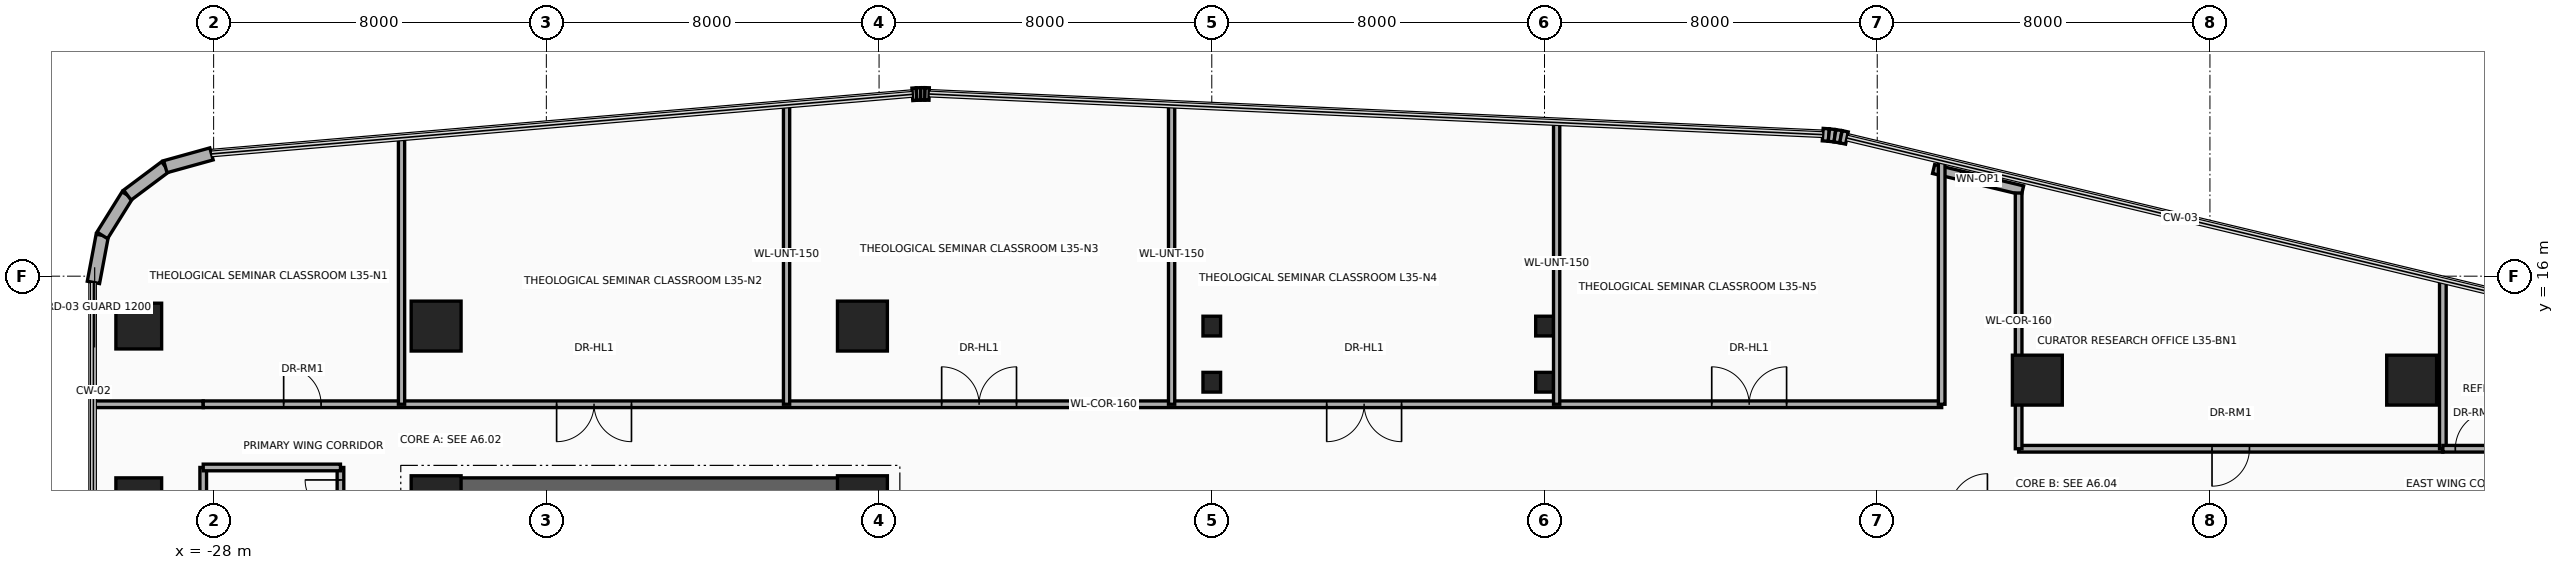
"""IFC4 building model, lengths in metres.
Left out: names, types, materials, properties, quantities, classifications, styles, units other than length and angle.
Written with IfcOpenShell. Run it as: python <this file> out.ifc"""

import sys

from ifc_helpers import new_model, si_unit, direction, frame, frame_2d, origin, origin_2d, place, context, subcontext, project, spatial, rectangle, circle, i_section, extrude, source, transform, mapped, element, fill, save


model = new_model("IFC4")
c1 = context("Model", 3, precision=1e-05, world=origin(), true_north=direction((0.0, 1.0)))
c2 = subcontext(c1, "Body", "Model", "MODEL_VIEW")
j1 = project(units=[si_unit("LENGTHUNIT", "METRE"), si_unit("PLANEANGLEUNIT", "RADIAN")], contexts=[c1])
p1 = place(None, origin())
s1 = spatial("IfcSite", under=j1, at=p1, CompositionType="ELEMENT")
p2 = place(p1, origin())
s2 = spatial("IfcBuilding", under=s1, at=p2, CompositionType="ELEMENT")
p3 = place(p2, frame((0.0, 0.0, 139.0)))
s3 = spatial("IfcBuildingStorey", under=s2, at=p3, CompositionType="ELEMENT", Elevation=139.0)
p4 = place(p3, frame((-22.65, -11.15, 0.0), z_axis=(0.0, 0.0, 1.0), x_axis=(0.0, 1.0, 0.0)))
e1 = element("IfcWall", 1, at=p4, inside=s3, PredefinedType="SHEAR", context=c2, shape_type="SweptSolid", body=[
    extrude(rectangle(XDim=22.3, YDim=0.7, at=frame_2d((11.15, 0.0))), origin(), (0.0, 0.0, 1.0), 3.46),
])
p5 = place(p3, frame((-22.65, 10.8, 0.0), z_axis=(0.0, 0.0, 1.0), x_axis=(1.0, 0.0, 0.0)))
e2 = element("IfcWall", 2, at=p5, inside=s3, PredefinedType="SHEAR", context=c2, shape_type="SweptSolid", body=[
    extrude(rectangle(XDim=10.25, YDim=0.7, at=frame_2d((5.125, 0.0))), origin(), (0.0, 0.0, 1.0), 3.46),
])
m1 = source(origin(), c2, "Body", "SweptSolid", [
    extrude(circle(Radius=0.55, at=origin_2d()), origin(), (0.0, 0.0, 1.0), 3.7),
])
p6 = place(p3, frame((-29.8, 10.6, 0.0), z_axis=(0.0, 0.0, 1.0), x_axis=(1.0, 0.0, 0.0)))
e3 = element("IfcColumn", 3, at=p6, inside=s3, PredefinedType="COLUMN", context=c2, shape_type="MappedRepresentation", body=[
    mapped(m1, transform((0.0, 0.0, 0.0), x_axis=(1.0, 0.0, 0.0), y_axis=(0.0, 1.0, 0.0), z_axis=(0.0, 0.0, 1.0), scale=1.0)),
])
m2 = source(origin(), c2, "Body", "SweptSolid", [
    extrude(rectangle(XDim=1.2, YDim=1.2, at=origin_2d()), origin(), (0.0, 0.0, 1.0), 3.7),
])
for number, where, z_axis, x_axis in (
    (4, (-22.65, 10.6, 0.0), (0.0, 0.0, 1.0), (1.0, 0.0, 0.0)),
    (5, (-12.4, 10.6, 0.0), (0.0, 0.0, 1.0), (1.0, 0.0, 0.0)),
):
    element("IfcColumn", number, at=place(p3, frame(where, z_axis=z_axis, x_axis=x_axis)), inside=s3, PredefinedType="COLUMN", context=c2, shape_type="MappedRepresentation", body=[
        mapped(m2, transform((0.0, 0.0, 0.0), x_axis=(1.0, 0.0, 0.0), y_axis=(0.0, 1.0, 0.0), z_axis=(0.0, 0.0, 1.0), scale=1.0)),
    ])
p7 = place(p3, frame((-29.8, 14.8, 0.0), z_axis=(0.0, 0.0, 1.0), x_axis=(1.0, 0.0, 0.0)))
e6 = element("IfcColumn", 6, at=p7, inside=s3, PredefinedType="COLUMN", context=c2, shape_type="MappedRepresentation", body=[
    mapped(m1, transform((0.0, 0.0, 0.0), x_axis=(1.0, 0.0, 0.0), y_axis=(0.0, 1.0, 0.0), z_axis=(0.0, 0.0, 1.0), scale=1.0)),
])
for number, where, z_axis, x_axis in (
    (7, (-22.65, 14.8, 0.0), (0.0, 0.0, 1.0), (1.0, 0.0, 0.0)),
    (8, (-12.4, 14.8, 0.0), (0.0, 0.0, 1.0), (1.0, 0.0, 0.0)),
    (9, (15.85, 13.5, 0.0), (0.0, 0.0, 1.0), (1.0, 0.0, 0.0)),
    (10, (24.85, 13.5, 0.0), (0.0, 0.0, 1.0), (1.0, 0.0, 0.0)),
):
    element("IfcColumn", number, at=place(p3, frame(where, z_axis=z_axis, x_axis=x_axis)), inside=s3, PredefinedType="COLUMN", context=c2, shape_type="MappedRepresentation", body=[
        mapped(m2, transform((0.0, 0.0, 0.0), x_axis=(1.0, 0.0, 0.0), y_axis=(0.0, 1.0, 0.0), z_axis=(0.0, 0.0, 1.0), scale=1.0)),
    ])
m3 = source(origin(), c2, "Body", "SweptSolid", [
    extrude(i_section(OverallWidth=0.424, OverallDepth=0.474, WebThickness=0.048, FlangeThickness=0.077, at=origin_2d()), origin(), (0.0, 0.0, 1.0), 3.7),
])
for number, where, z_axis, x_axis in (
    (11, (-4.0, 13.45, 0.0), (0.0, 0.0, 1.0), (1.0, 0.0, 0.0)),
    (12, (-4.0, 14.8, 0.0), (0.0, 0.0, 1.0), (1.0, 0.0, 0.0)),
    (13, (4.0, 13.45, 0.0), (0.0, 0.0, 1.0), (1.0, 0.0, 0.0)),
    (14, (4.0, 14.8, 0.0), (0.0, 0.0, 1.0), (1.0, 0.0, 0.0)),
):
    element("IfcColumn", number, at=place(p3, frame(where, z_axis=z_axis, x_axis=x_axis)), inside=s3, PredefinedType="COLUMN", context=c2, shape_type="MappedRepresentation", body=[
        mapped(m3, transform((0.0, 0.0, 0.0), x_axis=(1.0, 0.0, 0.0), y_axis=(0.0, 1.0, 0.0), z_axis=(0.0, 0.0, 1.0), scale=1.0)),
    ])
p8 = place(p3, frame((-30.89, 15.85, 0.0), z_axis=(0.0, 0.0, 1.0), x_axis=(0.184557499391, 0.982821718023, 0.0)))
e15 = element("IfcWall", 15, at=p8, inside=s3, PredefinedType="SOLIDWALL", context=c2, shape_type="SweptSolid", body=[
    extrude(rectangle(XDim=1.151, YDim=0.3, at=frame_2d((0.575, 0.0))), origin(), (0.0, 0.0, 1.0), 3.46),
])
p9 = place(p3, frame((-30.677, 16.981, 0.0), z_axis=(0.0, 0.0, 1.0), x_axis=(0.52880576008, 0.848742875143, 0.0)))
e16 = element("IfcWall", 16, at=p9, inside=s3, PredefinedType="SOLIDWALL", context=c2, shape_type="SweptSolid", body=[
    extrude(rectangle(XDim=1.141, YDim=0.3, at=frame_2d((0.57, 0.0))), origin(), (0.0, 0.0, 1.0), 3.46),
])
p10 = place(p3, frame((-30.074, 17.95, 0.0), z_axis=(0.0, 0.0, 1.0), x_axis=(0.800975009324, 0.598697782223, 0.0)))
e17 = element("IfcWall", 17, at=p10, inside=s3, PredefinedType="SOLIDWALL", context=c2, shape_type="SweptSolid", body=[
    extrude(rectangle(XDim=1.141, YDim=0.3, at=frame_2d((0.57, 0.0))), origin(), (0.0, 0.0, 1.0), 3.46),
])
p11 = place(p3, frame((-29.161, 18.633, 0.0), z_axis=(0.0, 0.0, 1.0), x_axis=(0.963624193367, 0.267260947313, 0.0)))
e18 = element("IfcWall", 18, at=p11, inside=s3, PredefinedType="SOLIDWALL", context=c2, shape_type="SweptSolid", body=[
    extrude(rectangle(XDim=1.151, YDim=0.3, at=frame_2d((0.575, 0.0))), origin(), (0.0, 0.0, 1.0), 3.46),
])
p12 = place(p3, frame((-11.199, 20.373, 0.0), z_axis=(0.0, 0.0, 1.0), x_axis=(0.997567332166, 0.069709524416, 0.0)))
e19 = element("IfcWall", 19, at=p12, inside=s3, PredefinedType="SOLIDWALL", context=c2, shape_type="SweptSolid", body=[
    extrude(rectangle(XDim=0.102, YDim=0.3, at=frame_2d((0.051, 0.0))), origin(), (0.0, 0.0, 1.0), 3.46),
])
p13 = place(p3, frame((-11.098, 20.38, 0.0), z_axis=(0.0, 0.0, 1.0), x_axis=(0.999334672785, 0.03647206835, 0.0)))
e20 = element("IfcWall", 20, at=p13, inside=s3, PredefinedType="SOLIDWALL", context=c2, shape_type="SweptSolid", body=[
    extrude(rectangle(XDim=0.1, YDim=0.3, at=frame_2d((0.05, 0.0))), origin(), (0.0, 0.0, 1.0), 3.46),
])
p14 = place(p3, frame((-10.998, 20.383, 0.0), z_axis=(0.0, 0.0, 1.0), x_axis=(0.999997054401, 0.002427177317, 0.0)))
e21 = element("IfcWall", 21, at=p14, inside=s3, PredefinedType="SOLIDWALL", context=c2, shape_type="SweptSolid", body=[
    extrude(rectangle(XDim=0.101, YDim=0.3, at=frame_2d((0.05, 0.0))), origin(), (0.0, 0.0, 1.0), 3.46),
])
p15 = place(p3, frame((-10.897, 20.384, 0.0), z_axis=(0.0, 0.0, 1.0), x_axis=(0.999584209171, -0.02883415988, 0.0)))
e22 = element("IfcWall", 22, at=p15, inside=s3, PredefinedType="SOLIDWALL", context=c2, shape_type="SweptSolid", body=[
    extrude(rectangle(XDim=0.102, YDim=0.3, at=frame_2d((0.051, 0.0))), origin(), (0.0, 0.0, 1.0), 3.46),
])
p16 = place(p3, frame((10.69, 19.404, 0.0), z_axis=(0.0, 0.0, 1.0), x_axis=(0.99758310784, -0.069483400546, 0.0)))
e23 = element("IfcWall", 23, at=p16, inside=s3, PredefinedType="SOLIDWALL", context=c2, shape_type="SweptSolid", body=[
    extrude(rectangle(XDim=0.147, YDim=0.3, at=frame_2d((0.074, 0.0))), origin(), (0.0, 0.0, 1.0), 3.46),
])
for number, where, z_axis, x_axis in (
    (24, (10.837, 19.394, 0.0), (0.0, 0.0, 1.0), (0.993, -0.117, 0.0)),
    (25, (10.983, 19.377, 0.0), (0.0, 0.0, 1.0), (0.987, -0.163, 0.0)),
):
    element("IfcWall", number, at=place(p3, frame(where, z_axis=z_axis, x_axis=x_axis)), inside=s3, PredefinedType="SOLIDWALL", context=c2, shape_type="SweptSolid", body=[
        extrude(rectangle(XDim=0.146, YDim=0.3, at=frame_2d((0.073, 0.0))), origin(), (0.0, 0.0, 1.0), 3.46),
    ])
p17 = place(p3, frame((11.127, 19.353, 0.0), z_axis=(0.0, 0.0, 1.0), x_axis=(0.978019841688, -0.208511844421, 0.0)))
e26 = element("IfcWall", 26, at=p17, inside=s3, PredefinedType="SOLIDWALL", context=c2, shape_type="SweptSolid", body=[
    extrude(rectangle(XDim=0.147, YDim=0.3, at=frame_2d((0.074, 0.0))), origin(), (0.0, 0.0, 1.0), 3.46),
])
p18 = place(p3, frame((13.355, 18.576, 0.0), z_axis=(0.0, 0.0, 1.0), x_axis=(0.97252211384, -0.232810519721, 0.0)))
e27 = element("IfcWall", 27, at=p18, inside=s3, PredefinedType="SOLIDWALL", context=c2, shape_type="SweptSolid", body=[
    extrude(rectangle(XDim=2.2, YDim=0.22, at=frame_2d((1.1, 0.0))), origin(), (0.0, 0.0, 1.0), 3.46),
])
p19 = place(p18, frame((0.65, 0.0, 0.95)))
e28 = element("IfcOpeningElement", 28, at=p19, cuts=e27, PredefinedType="OPENING", context=c2, shape_type="SweptSolid", body=[
    extrude(rectangle(XDim=0.9, YDim=1.3, at=frame_2d((0.45, 0.65))), frame((0.0, 0.125, 0.0), z_axis=(0.0, -1.0, 0.0), x_axis=(1.0, 0.0, 0.0)), (0.0, 0.0, 1.0), 0.25),
])
p20 = place(p3, frame((-28.25, 8.8, 0.0), z_axis=(0.0, 0.0, 1.0), x_axis=(0.0, 1.0, 0.0)))
e29 = element("IfcWall", 29, at=p20, inside=s3, PredefinedType="PARTITIONING", context=c2, shape_type="SweptSolid", body=[
    extrude(rectangle(XDim=2.6, YDim=0.16, at=frame_2d((1.3, 0.0))), origin(), (0.0, 0.0, 1.0), 2.666),
])
p21 = place(p3, frame((-24.95, 8.8, 0.0), z_axis=(0.0, 0.0, 1.0), x_axis=(0.0, 1.0, 0.0)))
e30 = element("IfcWall", 30, at=p21, inside=s3, PredefinedType="PARTITIONING", context=c2, shape_type="SweptSolid", body=[
    extrude(rectangle(XDim=2.6, YDim=0.16, at=frame_2d((1.3, 0.0))), origin(), (0.0, 0.0, 1.0), 2.666),
])
p22 = place(p21, frame((0.3, 0.0, 0.0)))
e31 = element("IfcOpeningElement", 31, at=p22, cuts=e30, PredefinedType="OPENING", context=c2, shape_type="SweptSolid", body=[
    extrude(rectangle(XDim=0.85, YDim=2.1, at=frame_2d((0.425, 1.05))), frame((0.0, 0.095, 0.0), z_axis=(0.0, -1.0, 0.0), x_axis=(1.0, 0.0, 0.0)), (0.0, 0.0, 1.0), 0.19),
])
p23 = place(p21, frame((1.45, 0.0, 0.0)))
e32 = element("IfcOpeningElement", 32, at=p23, cuts=e30, PredefinedType="OPENING", context=c2, shape_type="SweptSolid", body=[
    extrude(rectangle(XDim=0.85, YDim=2.1, at=frame_2d((0.425, 1.05))), frame((0.0, 0.095, 0.0), z_axis=(0.0, -1.0, 0.0), x_axis=(1.0, 0.0, 0.0)), (0.0, 0.0, 1.0), 0.19),
])
p24 = place(p3, frame((-28.25, 11.4, 0.0), z_axis=(0.0, 0.0, 1.0), x_axis=(1.0, 0.0, 0.0)))
e33 = element("IfcWall", 33, at=p24, inside=s3, PredefinedType="PARTITIONING", context=c2, shape_type="SweptSolid", body=[
    extrude(rectangle(XDim=3.3, YDim=0.16, at=frame_2d((1.65, 0.0))), origin(), (0.0, 0.0, 1.0), 3.46),
])
p25 = place(p3, frame((-30.89, 12.92, 0.0), z_axis=(0.0, 0.0, 1.0), x_axis=(1.0, 0.0, 0.0)))
e34 = element("IfcWall", 34, at=p25, inside=s3, PredefinedType="PARTITIONING", context=c2, shape_type="SweptSolid", body=[
    extrude(rectangle(XDim=2.64, YDim=0.16, at=frame_2d((1.32, 0.0))), origin(), (0.0, 0.0, 1.0), 2.896),
])
p26 = place(p3, frame((-28.25, 12.92, 0.0), z_axis=(0.0, 0.0, 1.0), x_axis=(1.0, 0.0, 0.0)))
e35 = element("IfcWall", 35, at=p26, inside=s3, PredefinedType="PARTITIONING", context=c2, shape_type="SweptSolid", body=[
    extrude(rectangle(XDim=41.8, YDim=0.16, at=frame_2d((20.9, 0.0))), origin(), (0.0, 0.0, 1.0), 2.666),
])
p27 = place(p26, frame((1.934, 0.0, 0.0)))
e36 = element("IfcOpeningElement", 36, at=p27, cuts=e35, PredefinedType="OPENING", context=c2, shape_type="SweptSolid", body=[
    extrude(rectangle(XDim=0.9, YDim=2.1, at=frame_2d((0.45, 1.05))), frame((0.0, 0.095, 0.0), z_axis=(0.0, -1.0, 0.0), x_axis=(1.0, 0.0, 0.0)), (0.0, 0.0, 1.0), 0.19),
])
p28 = place(p26, frame((8.497, 0.0, 0.0)))
e37 = element("IfcOpeningElement", 37, at=p28, cuts=e35, PredefinedType="OPENING", context=c2, shape_type="SweptSolid", body=[
    extrude(rectangle(XDim=1.8, YDim=2.15, at=frame_2d((0.9, 1.075))), frame((0.0, 0.095, 0.0), z_axis=(0.0, -1.0, 0.0), x_axis=(1.0, 0.0, 0.0)), (0.0, 0.0, 1.0), 0.19),
])
p29 = place(p26, frame((17.755, 0.0, 0.0)))
e38 = element("IfcOpeningElement", 38, at=p29, cuts=e35, PredefinedType="OPENING", context=c2, shape_type="SweptSolid", body=[
    extrude(rectangle(XDim=1.8, YDim=2.15, at=frame_2d((0.9, 1.075))), frame((0.0, 0.095, 0.0), z_axis=(0.0, -1.0, 0.0), x_axis=(1.0, 0.0, 0.0)), (0.0, 0.0, 1.0), 0.19),
])
p30 = place(p26, frame((27.013, 0.0, 0.0)))
e39 = element("IfcOpeningElement", 39, at=p30, cuts=e35, PredefinedType="OPENING", context=c2, shape_type="SweptSolid", body=[
    extrude(rectangle(XDim=1.8, YDim=2.15, at=frame_2d((0.9, 1.075))), frame((0.0, 0.095, 0.0), z_axis=(0.0, -1.0, 0.0), x_axis=(1.0, 0.0, 0.0)), (0.0, 0.0, 1.0), 0.19),
])
p31 = place(p26, frame((36.271, 0.0, 0.0)))
e40 = element("IfcOpeningElement", 40, at=p31, cuts=e35, PredefinedType="OPENING", context=c2, shape_type="SweptSolid", body=[
    extrude(rectangle(XDim=1.8, YDim=2.15, at=frame_2d((0.9, 1.075))), frame((0.0, 0.095, 0.0), z_axis=(0.0, -1.0, 0.0), x_axis=(1.0, 0.0, 0.0)), (0.0, 0.0, 1.0), 0.19),
])
p32 = place(p3, frame((13.55, 12.92, 0.0), z_axis=(0.0, 0.0, 1.0), x_axis=(0.0, 1.0, 0.0)))
e41 = element("IfcWall", 41, at=p32, inside=s3, PredefinedType="PARTITIONING", context=c2, shape_type="SweptSolid", body=[
    extrude(rectangle(XDim=5.857, YDim=0.16, at=frame_2d((2.928, 0.0))), origin(), (0.0, 0.0, 1.0), 2.666),
])
p33 = place(p3, frame((-23.482, 12.92, 0.0), z_axis=(0.0, 0.0, 1.0), x_axis=(0.0, 1.0, 0.0)))
e42 = element("IfcWall", 42, at=p33, inside=s3, PredefinedType="PARTITIONING", context=c2, shape_type="SweptSolid", body=[
    extrude(rectangle(XDim=6.409, YDim=0.15, at=frame_2d((3.204, 0.0))), origin(), (0.0, 0.0, 1.0), 2.666),
])
for number, where, z_axis, x_axis in (
    (43, (-14.224, 12.92, 0.0), (0.0, 0.0, 1.0), (0.0, 1.0, 0.0)),
    (44, (-4.966, 12.92, 0.0), (0.0, 0.0, 1.0), (0.0, 1.0, 0.0)),
):
    element("IfcWall", number, at=place(p3, frame(where, z_axis=z_axis, x_axis=x_axis)), inside=s3, PredefinedType="PARTITIONING", context=c2, shape_type="SweptSolid", body=[
        extrude(rectangle(XDim=7.196, YDim=0.15, at=frame_2d((3.598, 0.0))), origin(), (0.0, 0.0, 1.0), 2.666),
    ])
p34 = place(p3, frame((4.292, 12.92, 0.0), z_axis=(0.0, 0.0, 1.0), x_axis=(0.0, 1.0, 0.0)))
e45 = element("IfcWall", 45, at=p34, inside=s3, PredefinedType="PARTITIONING", context=c2, shape_type="SweptSolid", body=[
    extrude(rectangle(XDim=6.775, YDim=0.15, at=frame_2d((3.387, 0.0))), origin(), (0.0, 0.0, 1.0), 2.666),
])
p35 = place(p3, frame((15.4, 11.85, 0.0), z_axis=(0.0, 0.0, 1.0), x_axis=(1.0, 0.0, 0.0)))
e46 = element("IfcWall", 46, at=p35, inside=s3, PredefinedType="PARTITIONING", context=c2, shape_type="SweptSolid", body=[
    extrude(rectangle(XDim=10.2, YDim=0.16, at=frame_2d((5.1, 0.0))), origin(), (0.0, 0.0, 1.0), 2.834),
])
p36 = place(p35, frame((4.65, 0.0, 0.0)))
e47 = element("IfcOpeningElement", 47, at=p36, cuts=e46, PredefinedType="OPENING", context=c2, shape_type="SweptSolid", body=[
    extrude(rectangle(XDim=0.9, YDim=2.1, at=frame_2d((0.45, 1.05))), frame((0.0, 0.095, 0.0), z_axis=(0.0, -1.0, 0.0), x_axis=(1.0, 0.0, 0.0)), (0.0, 0.0, 1.0), 0.19),
])
p37 = place(p3, frame((15.4, 11.85, 0.0), z_axis=(0.0, 0.0, 1.0), x_axis=(0.0, 1.0, 0.0)))
e48 = element("IfcWall", 48, at=p37, inside=s3, PredefinedType="PARTITIONING", context=c2, shape_type="SweptSolid", body=[
    extrude(rectangle(XDim=6.15, YDim=0.16, at=frame_2d((3.075, 0.0))), origin(), (0.0, 0.0, 1.0), 2.666),
])
p38 = place(p3, frame((25.6, 11.85, 0.0), z_axis=(0.0, 0.0, 1.0), x_axis=(0.0, 1.0, 0.0)))
e49 = element("IfcWall", 49, at=p38, inside=s3, PredefinedType="PARTITIONING", context=c2, shape_type="SweptSolid", body=[
    extrude(rectangle(XDim=4.042, YDim=0.16, at=frame_2d((2.021, 0.0))), origin(), (0.0, 0.0, 1.0), 2.666),
])
p39 = place(p3, frame((25.6, 11.85, 0.0), z_axis=(0.0, 0.0, 1.0), x_axis=(1.0, 0.0, 0.0)))
e50 = element("IfcWall", 50, at=p39, inside=s3, PredefinedType="PARTITIONING", context=c2, shape_type="SweptSolid", body=[
    extrude(rectangle(XDim=4.09, YDim=0.16, at=frame_2d((2.045, 0.0))), origin(), (0.0, 0.0, 1.0), 2.896),
])
p40 = place(p39, frame((0.3, 0.0, 0.0)))
e51 = element("IfcOpeningElement", 51, at=p40, cuts=e50, PredefinedType="OPENING", context=c2, shape_type="SweptSolid", body=[
    extrude(rectangle(XDim=0.9, YDim=2.1, at=frame_2d((0.45, 1.05))), frame((0.0, 0.095, 0.0), z_axis=(0.0, -1.0, 0.0), x_axis=(1.0, 0.0, 0.0)), (0.0, 0.0, 1.0), 0.19),
])
p41 = place(p19, origin())
e52 = element("IfcWindow", 52, at=p41, inside=s3, PartitioningType="SINGLE_PANEL", PredefinedType="WINDOW", context=c2, shape_type="SweptSolid", body=[
    extrude(rectangle(XDim=0.9, YDim=1.3, at=frame_2d((0.45, 0.65))), frame((0.0, 0.03, 0.0), z_axis=(0.0, -1.0, 0.0), x_axis=(1.0, 0.0, 0.0)), (0.0, 0.0, 1.0), 0.06),
])
fill(e28, e52)
p42 = place(p23, origin())
e53 = element("IfcDoor", 53, at=p42, inside=s3, OperationType="SINGLE_SWING_LEFT", PredefinedType="DOOR", context=c2, shape_type="SweptSolid", body=[
    extrude(rectangle(XDim=0.85, YDim=2.1, at=frame_2d((0.425, 1.05))), frame((0.0, 0.025, 0.0), z_axis=(0.0, -1.0, 0.0), x_axis=(1.0, 0.0, 0.0)), (0.0, 0.0, 1.0), 0.05),
])
fill(e32, e53)
p43 = place(p27, origin())
e54 = element("IfcDoor", 54, at=p43, inside=s3, OperationType="SINGLE_SWING_RIGHT", PredefinedType="DOOR", context=c2, shape_type="SweptSolid", body=[
    extrude(rectangle(XDim=0.9, YDim=2.1, at=frame_2d((0.45, 1.05))), frame((0.0, 0.025, 0.0), z_axis=(0.0, -1.0, 0.0), x_axis=(1.0, 0.0, 0.0)), (0.0, 0.0, 1.0), 0.05),
])
fill(e36, e54)
p44 = place(p28, frame((1.8, 0.0, 0.0), z_axis=(0.0, 0.0, 1.0), x_axis=(-1.0, 0.0, 0.0)))
e55 = element("IfcDoor", 55, at=p44, inside=s3, OperationType="DOUBLE_DOOR_SINGLE_SWING", PredefinedType="DOOR", context=c2, shape_type="SweptSolid", body=[
    extrude(rectangle(XDim=1.8, YDim=2.15, at=frame_2d((0.9, 1.075))), frame((0.0, 0.025, 0.0), z_axis=(0.0, -1.0, 0.0), x_axis=(1.0, 0.0, 0.0)), (0.0, 0.0, 1.0), 0.05),
])
fill(e37, e55)
p45 = place(p29, origin())
e56 = element("IfcDoor", 56, at=p45, inside=s3, OperationType="DOUBLE_DOOR_SINGLE_SWING", PredefinedType="DOOR", context=c2, shape_type="SweptSolid", body=[
    extrude(rectangle(XDim=1.8, YDim=2.15, at=frame_2d((0.9, 1.075))), frame((0.0, 0.025, 0.0), z_axis=(0.0, -1.0, 0.0), x_axis=(1.0, 0.0, 0.0)), (0.0, 0.0, 1.0), 0.05),
])
fill(e38, e56)
p46 = place(p30, frame((1.8, 0.0, 0.0), z_axis=(0.0, 0.0, 1.0), x_axis=(-1.0, 0.0, 0.0)))
e57 = element("IfcDoor", 57, at=p46, inside=s3, OperationType="DOUBLE_DOOR_SINGLE_SWING", PredefinedType="DOOR", context=c2, shape_type="SweptSolid", body=[
    extrude(rectangle(XDim=1.8, YDim=2.15, at=frame_2d((0.9, 1.075))), frame((0.0, 0.025, 0.0), z_axis=(0.0, -1.0, 0.0), x_axis=(1.0, 0.0, 0.0)), (0.0, 0.0, 1.0), 0.05),
])
fill(e39, e57)
p47 = place(p31, origin())
e58 = element("IfcDoor", 58, at=p47, inside=s3, OperationType="DOUBLE_DOOR_SINGLE_SWING", PredefinedType="DOOR", context=c2, shape_type="SweptSolid", body=[
    extrude(rectangle(XDim=1.8, YDim=2.15, at=frame_2d((0.9, 1.075))), frame((0.0, 0.025, 0.0), z_axis=(0.0, -1.0, 0.0), x_axis=(1.0, 0.0, 0.0)), (0.0, 0.0, 1.0), 0.05),
])
fill(e40, e58)
p48 = place(p36, frame((0.9, 0.0, 0.0), z_axis=(0.0, 0.0, 1.0), x_axis=(-1.0, 0.0, 0.0)))
e59 = element("IfcDoor", 59, at=p48, inside=s3, OperationType="SINGLE_SWING_LEFT", PredefinedType="DOOR", context=c2, shape_type="SweptSolid", body=[
    extrude(rectangle(XDim=0.9, YDim=2.1, at=frame_2d((0.45, 1.05))), frame((0.0, 0.025, 0.0), z_axis=(0.0, -1.0, 0.0), x_axis=(1.0, 0.0, 0.0)), (0.0, 0.0, 1.0), 0.05),
])
fill(e47, e59)
p49 = place(p40, origin())
e60 = element("IfcDoor", 60, at=p49, inside=s3, OperationType="SINGLE_SWING_LEFT", PredefinedType="DOOR", context=c2, shape_type="SweptSolid", body=[
    extrude(rectangle(XDim=0.9, YDim=2.1, at=frame_2d((0.45, 1.05))), frame((0.0, 0.025, 0.0), z_axis=(0.0, -1.0, 0.0), x_axis=(1.0, 0.0, 0.0)), (0.0, 0.0, 1.0), 0.05),
])
fill(e51, e60)
save(model, sys.argv[1])
